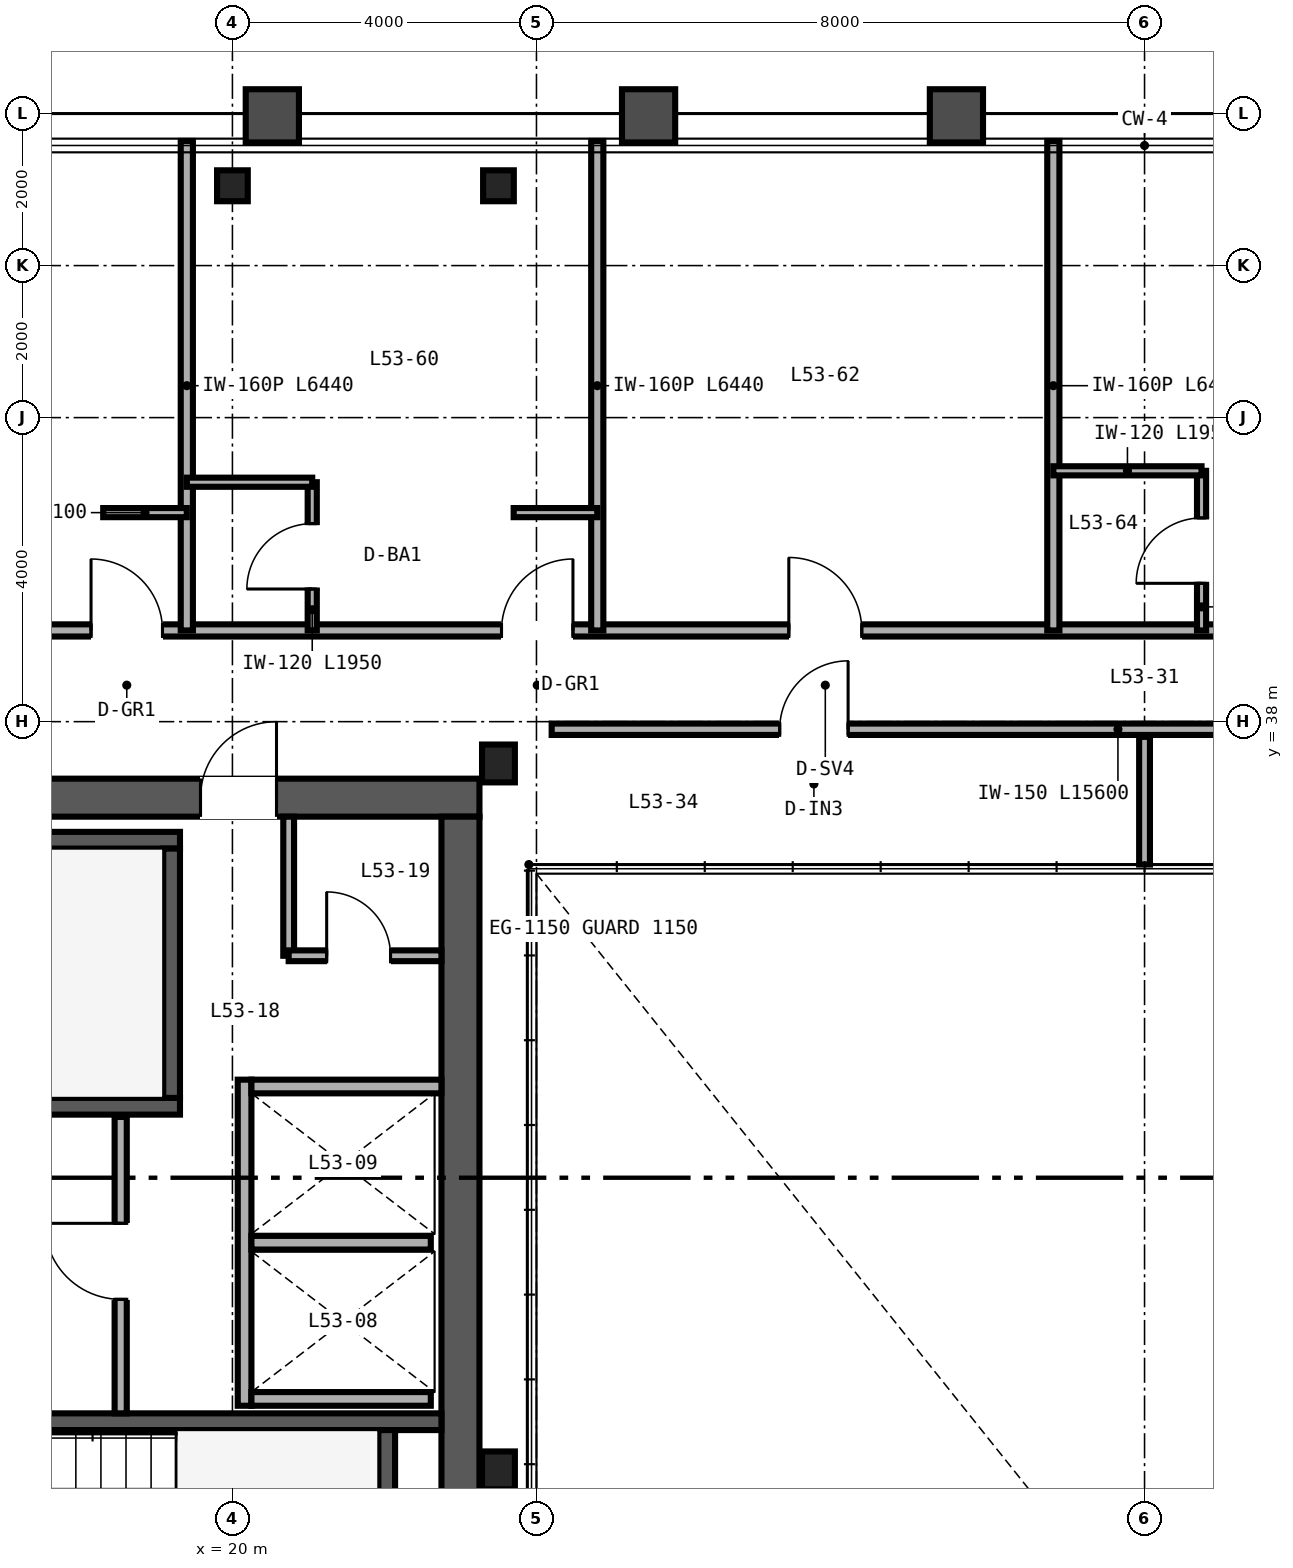
"""IFC4 building model, lengths in metres.
Left out: names, types, materials, properties, quantities, classifications, styles, units other than length and angle.
Written with IfcOpenShell. Run it as: python <this file> out.ifc"""

import sys

from ifc_helpers import new_model, si_unit, direction, frame, frame_2d, origin, origin_2d, place, context, subcontext, project, spatial, rectangle, i_section, extrude, source, transform, mapped, element, fill, save


model = new_model("IFC4")
c1 = context("Model", 3, precision=1e-05, world=origin(), true_north=direction((0.0, 1.0)))
c2 = subcontext(c1, "Body", "Model", "MODEL_VIEW")
j1 = project(units=[si_unit("LENGTHUNIT", "METRE"), si_unit("PLANEANGLEUNIT", "RADIAN")], contexts=[c1])
p1 = place(None, origin())
s1 = spatial("IfcSite", under=j1, at=p1, CompositionType="ELEMENT")
p2 = place(p1, origin())
s2 = spatial("IfcBuilding", under=s1, at=p2, CompositionType="ELEMENT")
p3 = place(p2, frame((0.0, 0.0, 210.0)))
s3 = spatial("IfcBuildingStorey", under=s2, at=p3, CompositionType="ELEMENT", Elevation=210.0)
p4 = place(p3, frame((10.75, 37.0, 0.0), z_axis=(0.0, 0.0, 1.0), x_axis=(1.0, 0.0, 0.0)))
e1 = element("IfcWall", 1, at=p4, inside=s3, PredefinedType="SHEAR", context=c2, shape_type="SweptSolid", body=[
    extrude(rectangle(XDim=12.5, YDim=0.5, at=frame_2d((6.25, 0.0))), origin(), (0.0, 0.0, 1.0), 3.37),
])
p5 = place(p4, frame((8.83, 0.0, 0.0)))
e2 = element("IfcOpeningElement", 2, at=p5, cuts=e1, PredefinedType="OPENING", context=c2, shape_type="SweptSolid", body=[
    extrude(rectangle(XDim=1.0, YDim=2.15, at=frame_2d((0.5, 1.075))), frame((0.0, 0.26, 0.0), z_axis=(0.0, -1.0, 0.0), x_axis=(1.0, 0.0, 0.0)), (0.0, 0.0, 1.0), 0.52),
])
p6 = place(p3, frame((23.0, 15.25, 0.0), z_axis=(0.0, 0.0, 1.0), x_axis=(0.0, 1.0, 0.0)))
e3 = element("IfcWall", 3, at=p6, inside=s3, PredefinedType="SHEAR", context=c2, shape_type="SweptSolid", body=[
    extrude(rectangle(XDim=21.5, YDim=0.5, at=frame_2d((10.75, 0.0))), origin(), (0.0, 0.0, 1.0), 3.37),
])
p7 = place(p3, frame((11.25, 32.94, 0.0), z_axis=(0.0, 0.0, 1.0), x_axis=(1.0, 0.0, 0.0)))
e4 = element("IfcWall", 4, at=p7, inside=s3, PredefinedType="SHEAR", context=c2, shape_type="SweptSolid", body=[
    extrude(rectangle(XDim=8.06, YDim=0.22, at=frame_2d((4.03, 0.0))), origin(), (0.0, 0.0, 1.0), 3.4),
])
p8 = place(p7, frame((0.67, 0.0, 0.0)))
e5 = element("IfcOpeningElement", 5, at=p8, cuts=e4, PredefinedType="OPENING", context=c2, shape_type="SweptSolid", body=[
    extrude(rectangle(XDim=1.05, YDim=2.15, at=frame_2d((0.525, 1.075))), frame((0.0, 0.12, 0.0), z_axis=(0.0, -1.0, 0.0), x_axis=(1.0, 0.0, 0.0)), (0.0, 0.0, 1.0), 0.24),
])
p9 = place(p3, frame((11.25, 36.44, 0.0), z_axis=(0.0, 0.0, 1.0), x_axis=(1.0, 0.0, 0.0)))
e6 = element("IfcWall", 6, at=p9, inside=s3, PredefinedType="SHEAR", context=c2, shape_type="SweptSolid", body=[
    extrude(rectangle(XDim=8.06, YDim=0.22, at=frame_2d((4.03, 0.0))), origin(), (0.0, 0.0, 1.0), 3.4),
])
p10 = place(p3, frame((19.2, 33.05, 0.0), z_axis=(0.0, 0.0, 1.0), x_axis=(0.0, 1.0, 0.0)))
e7 = element("IfcWall", 7, at=p10, inside=s3, PredefinedType="SHEAR", context=c2, shape_type="SweptSolid", body=[
    extrude(rectangle(XDim=3.28, YDim=0.22, at=frame_2d((1.64, 0.0))), origin(), (0.0, 0.0, 1.0), 3.4),
])
p11 = place(p3, frame((14.18, 28.79, 0.0), z_axis=(0.0, 0.0, 1.0), x_axis=(1.0, 0.0, 0.0)))
e8 = element("IfcWall", 8, at=p11, inside=s3, PredefinedType="SHEAR", context=c2, shape_type="SweptSolid", body=[
    extrude(rectangle(XDim=8.57, YDim=0.22, at=frame_2d((4.285, 0.0))), origin(), (0.0, 0.0, 1.0), 3.4),
])
p12 = place(p3, frame((22.03, 25.4, 0.0), z_axis=(0.0, 0.0, 1.0), x_axis=(0.0, 1.0, 0.0)))
e9 = element("IfcWall", 9, at=p12, inside=s3, PredefinedType="SHEAR", context=c2, shape_type="SweptSolid", body=[
    extrude(rectangle(XDim=3.28, YDim=0.22, at=frame_2d((1.64, 0.0))), origin(), (0.0, 0.0, 1.0), 3.4),
])
m1 = source(origin(), c2, "Body", "SweptSolid", [
    extrude(i_section(OverallWidth=0.432, OverallDepth=0.498, WebThickness=0.056, FlangeThickness=0.089, FilletRadius=0.025, at=origin_2d()), origin(), (0.0, 0.0, 1.0), 3.37),
])
for number, where, z_axis, x_axis in (
    (10, (23.5, 28.15, 0.0), (0.0, 0.0, 1.0), (1.0, 0.0, 0.0)),
    (11, (23.5, 37.45, 0.0), (0.0, 0.0, 1.0), (1.0, 0.0, 0.0)),
):
    element("IfcColumn", number, at=place(p3, frame(where, z_axis=z_axis, x_axis=x_axis)), inside=s3, PredefinedType="COLUMN", context=c2, shape_type="MappedRepresentation", body=[
        mapped(m1, transform((0.0, 0.0, 0.0), scale=1.0)),
    ])
m2 = source(origin(), c2, "Body", "SweptSolid", [
    extrude(i_section(OverallWidth=0.404, OverallDepth=0.407, WebThickness=0.027, FlangeThickness=0.044, FilletRadius=0.025, at=origin_2d()), origin(), (0.0, 0.0, 1.0), 3.37),
])
for number, where, z_axis, x_axis in (
    (12, (20.0, 45.05, 0.0), (0.0, 0.0, 1.0), (1.0, 0.0, 0.0)),
    (13, (23.5, 45.05, 0.0), (0.0, 0.0, 1.0), (1.0, 0.0, 0.0)),
):
    element("IfcColumn", number, at=place(p3, frame(where, z_axis=z_axis, x_axis=x_axis)), inside=s3, PredefinedType="COLUMN", context=c2, shape_type="MappedRepresentation", body=[
        mapped(m2, transform((0.0, 0.0, 0.0), scale=1.0)),
    ])
p13 = place(p3, frame((20.16, 29.0, 0.0), z_axis=(0.0, 0.0, 1.0), x_axis=(0.0, 1.0, 0.0)))
e14 = element("IfcWall", 14, at=p13, inside=s3, PredefinedType="SOLIDWALL", context=c2, shape_type="SweptSolid", body=[
    extrude(rectangle(XDim=4.29, YDim=0.18, at=frame_2d((2.145, 0.0))), origin(), (0.0, 0.0, 1.0), 3.37),
])
p14 = place(p3, frame((20.25, 29.09, 0.0), z_axis=(0.0, 0.0, 1.0), x_axis=(1.0, 0.0, 0.0)))
e15 = element("IfcWall", 15, at=p14, inside=s3, PredefinedType="SOLIDWALL", context=c2, shape_type="SweptSolid", body=[
    extrude(rectangle(XDim=2.36, YDim=0.18, at=frame_2d((1.18, 0.0))), origin(), (0.0, 0.0, 1.0), 3.37),
])
p15 = place(p3, frame((20.25, 33.2, 0.0), z_axis=(0.0, 0.0, 1.0), x_axis=(1.0, 0.0, 0.0)))
e16 = element("IfcWall", 16, at=p15, inside=s3, PredefinedType="SOLIDWALL", context=c2, shape_type="SweptSolid", body=[
    extrude(rectangle(XDim=2.5, YDim=0.18, at=frame_2d((1.25, 0.0))), origin(), (0.0, 0.0, 1.0), 3.37),
])
p16 = place(p3, frame((20.25, 31.145, 0.0), z_axis=(0.0, 0.0, 1.0), x_axis=(1.0, 0.0, 0.0)))
e17 = element("IfcWall", 17, at=p16, inside=s3, PredefinedType="SOLIDWALL", context=c2, shape_type="SweptSolid", body=[
    extrude(rectangle(XDim=2.36, YDim=0.18, at=frame_2d((1.18, 0.0))), origin(), (0.0, 0.0, 1.0), 3.37),
])
p17 = place(p3, frame((18.53, 28.9, 0.0), z_axis=(0.0, 0.0, 1.0), x_axis=(0.0, 1.0, 0.0)))
e18 = element("IfcWall", 18, at=p17, inside=s3, PredefinedType="PARTITIONING", context=c2, shape_type="SweptSolid", body=[
    extrude(rectangle(XDim=3.9, YDim=0.16, at=frame_2d((1.95, 0.0))), origin(), (0.0, 0.0, 1.0), 3.37),
])
p18 = place(p17, frame((1.5, 0.0, 0.0)))
e19 = element("IfcOpeningElement", 19, at=p18, cuts=e18, PredefinedType="OPENING", context=c2, shape_type="SweptSolid", body=[
    extrude(rectangle(XDim=1.0, YDim=2.15, at=frame_2d((0.5, 1.075))), frame((0.0, 0.09, 0.0), z_axis=(0.0, -1.0, 0.0), x_axis=(1.0, 0.0, 0.0)), (0.0, 0.0, 1.0), 0.18),
])
p19 = place(p3, frame((20.74, 34.92, 0.0), z_axis=(0.0, 0.0, 1.0), x_axis=(0.0, 1.0, 0.0)))
e20 = element("IfcWall", 20, at=p19, inside=s3, PredefinedType="PARTITIONING", context=c2, shape_type="SweptSolid", body=[
    extrude(rectangle(XDim=1.83, YDim=0.142, at=frame_2d((0.915, 0.0))), origin(), (0.0, 0.0, 1.0), 3.37),
])
p20 = place(p3, frame((20.74, 34.92, 0.0), z_axis=(0.0, 0.0, 1.0), x_axis=(1.0, 0.0, 0.0)))
e21 = element("IfcWall", 21, at=p20, inside=s3, PredefinedType="PARTITIONING", context=c2, shape_type="SweptSolid", body=[
    extrude(rectangle(XDim=2.01, YDim=0.142, at=frame_2d((1.005, 0.0))), origin(), (0.0, 0.0, 1.0), 3.37),
])
p21 = place(p20, frame((0.5, 0.0, 0.0)))
e22 = element("IfcOpeningElement", 22, at=p21, cuts=e21, PredefinedType="OPENING", context=c2, shape_type="SweptSolid", body=[
    extrude(rectangle(XDim=0.84, YDim=2.1, at=frame_2d((0.42, 1.05))), frame((0.0, 0.081, 0.0), z_axis=(0.0, -1.0, 0.0), x_axis=(1.0, 0.0, 0.0)), (0.0, 0.0, 1.0), 0.162),
])
p22 = place(p3, frame((24.2, 37.9, 0.0), z_axis=(0.0, 0.0, 1.0), x_axis=(1.0, 0.0, 0.0)))
e23 = element("IfcWall", 23, at=p22, inside=s3, PredefinedType="PARTITIONING", context=c2, shape_type="SweptSolid", body=[
    extrude(rectangle(XDim=15.6, YDim=0.15, at=frame_2d((7.8, 0.0))), origin(), (0.0, 0.0, 1.0), 3.37),
])
p23 = place(p22, frame((3.0, 0.0, 0.0)))
e24 = element("IfcOpeningElement", 24, at=p23, cuts=e23, PredefinedType="OPENING", context=c2, shape_type="SweptSolid", body=[
    extrude(rectangle(XDim=0.9, YDim=2.15, at=frame_2d((0.45, 1.075))), frame((0.0, 0.085, 0.0), z_axis=(0.0, -1.0, 0.0), x_axis=(1.0, 0.0, 0.0)), (0.0, 0.0, 1.0), 0.17),
])
p24 = place(p22, frame((11.0, 0.0, 0.0)))
e25 = element("IfcOpeningElement", 25, at=p24, cuts=e23, PredefinedType="OPENING", context=c2, shape_type="SweptSolid", body=[
    extrude(rectangle(XDim=0.9, YDim=2.15, at=frame_2d((0.45, 1.075))), frame((0.0, 0.085, 0.0), z_axis=(0.0, -1.0, 0.0), x_axis=(1.0, 0.0, 0.0)), (0.0, 0.0, 1.0), 0.17),
])
p25 = place(p3, frame((32.0, 36.12, 0.0), z_axis=(0.0, 0.0, 1.0), x_axis=(0.0, 1.0, 0.0)))
e26 = element("IfcWall", 26, at=p25, inside=s3, PredefinedType="PARTITIONING", context=c2, shape_type="SweptSolid", body=[
    extrude(rectangle(XDim=1.68, YDim=0.142, at=frame_2d((0.84, 0.0))), origin(), (0.0, 0.0, 1.0), 3.37),
])
p26 = place(p3, frame((14.0, 39.2, 0.0), z_axis=(0.0, 0.0, 1.0), x_axis=(1.0, 0.0, 0.0)))
e27 = element("IfcWall", 27, at=p26, inside=s3, PredefinedType="PARTITIONING", context=c2, shape_type="SweptSolid", body=[
    extrude(rectangle(XDim=36.0, YDim=0.16, at=frame_2d((18.0, 0.0))), origin(), (0.0, 0.0, 1.0), 2.913),
])
p27 = place(p26, frame((4.14, 0.0, 0.0)))
e28 = element("IfcOpeningElement", 28, at=p27, cuts=e27, PredefinedType="OPENING", context=c2, shape_type="SweptSolid", body=[
    extrude(rectangle(XDim=0.94, YDim=2.15, at=frame_2d((0.47, 1.075))), frame((0.0, 0.09, 0.0), z_axis=(0.0, -1.0, 0.0), x_axis=(1.0, 0.0, 0.0)), (0.0, 0.0, 1.0), 0.18),
])
p28 = place(p26, frame((9.54, 0.0, 0.0)))
e29 = element("IfcOpeningElement", 29, at=p28, cuts=e27, PredefinedType="OPENING", context=c2, shape_type="SweptSolid", body=[
    extrude(rectangle(XDim=0.94, YDim=2.15, at=frame_2d((0.47, 1.075))), frame((0.0, 0.09, 0.0), z_axis=(0.0, -1.0, 0.0), x_axis=(1.0, 0.0, 0.0)), (0.0, 0.0, 1.0), 0.18),
])
p29 = place(p26, frame((13.32, 0.0, 0.0)))
e30 = element("IfcOpeningElement", 30, at=p29, cuts=e27, PredefinedType="OPENING", context=c2, shape_type="SweptSolid", body=[
    extrude(rectangle(XDim=0.96, YDim=2.15, at=frame_2d((0.48, 1.075))), frame((0.0, 0.09, 0.0), z_axis=(0.0, -1.0, 0.0), x_axis=(1.0, 0.0, 0.0)), (0.0, 0.0, 1.0), 0.18),
])
p30 = place(p26, frame((21.54, 0.0, 0.0)))
e31 = element("IfcOpeningElement", 31, at=p30, cuts=e27, PredefinedType="OPENING", context=c2, shape_type="SweptSolid", body=[
    extrude(rectangle(XDim=0.94, YDim=2.15, at=frame_2d((0.47, 1.075))), frame((0.0, 0.09, 0.0), z_axis=(0.0, -1.0, 0.0), x_axis=(1.0, 0.0, 0.0)), (0.0, 0.0, 1.0), 0.18),
])
p31 = place(p26, frame((28.14, 0.0, 0.0)))
e32 = element("IfcOpeningElement", 32, at=p31, cuts=e27, PredefinedType="OPENING", context=c2, shape_type="SweptSolid", body=[
    extrude(rectangle(XDim=0.94, YDim=2.15, at=frame_2d((0.47, 1.075))), frame((0.0, 0.09, 0.0), z_axis=(0.0, -1.0, 0.0), x_axis=(1.0, 0.0, 0.0)), (0.0, 0.0, 1.0), 0.18),
])
p32 = place(p26, frame((34.74, 0.0, 0.0)))
e33 = element("IfcOpeningElement", 33, at=p32, cuts=e27, PredefinedType="OPENING", context=c2, shape_type="SweptSolid", body=[
    extrude(rectangle(XDim=0.94, YDim=2.15, at=frame_2d((0.47, 1.075))), frame((0.0, 0.09, 0.0), z_axis=(0.0, -1.0, 0.0), x_axis=(1.0, 0.0, 0.0)), (0.0, 0.0, 1.0), 0.18),
])
p33 = place(p3, frame((19.4, 39.2, 0.0), z_axis=(0.0, 0.0, 1.0), x_axis=(0.0, 1.0, 0.0)))
e34 = element("IfcWall", 34, at=p33, inside=s3, PredefinedType="PARTITIONING", context=c2, shape_type="SweptSolid", body=[
    extrude(rectangle(XDim=6.44, YDim=0.16, at=frame_2d((3.22, 0.0))), origin(), (0.0, 0.0, 1.0), 2.677),
])
p34 = place(p3, frame((18.3, 40.75, 0.0), z_axis=(0.0, 0.0, 1.0), x_axis=(1.0, 0.0, 0.0)))
e35 = element("IfcWall", 35, at=p34, inside=s3, PredefinedType="PARTITIONING", context=c2, shape_type="SweptSolid", body=[
    extrude(rectangle(XDim=1.1, YDim=0.12, at=frame_2d((0.55, 0.0))), origin(), (0.0, 0.0, 1.0), 3.37),
])
p35 = place(p3, frame((24.8, 39.2, 0.0), z_axis=(0.0, 0.0, 1.0), x_axis=(0.0, 1.0, 0.0)))
e36 = element("IfcWall", 36, at=p35, inside=s3, PredefinedType="PARTITIONING", context=c2, shape_type="SweptSolid", body=[
    extrude(rectangle(XDim=6.44, YDim=0.16, at=frame_2d((3.22, 0.0))), origin(), (0.0, 0.0, 1.0), 2.443),
])
p36 = place(p3, frame((21.05, 39.2, 0.0), z_axis=(0.0, 0.0, 1.0), x_axis=(0.0, 1.0, 0.0)))
e37 = element("IfcWall", 37, at=p36, inside=s3, PredefinedType="PARTITIONING", context=c2, shape_type="SweptSolid", body=[
    extrude(rectangle(XDim=1.95, YDim=0.12, at=frame_2d((0.975, 0.0))), origin(), (0.0, 0.0, 1.0), 3.37),
])
p37 = place(p36, frame((0.545, 0.0, 0.0)))
e38 = element("IfcOpeningElement", 38, at=p37, cuts=e37, PredefinedType="OPENING", context=c2, shape_type="SweptSolid", body=[
    extrude(rectangle(XDim=0.86, YDim=2.1, at=frame_2d((0.43, 1.05))), frame((0.0, 0.07, 0.0), z_axis=(0.0, -1.0, 0.0), x_axis=(1.0, 0.0, 0.0)), (0.0, 0.0, 1.0), 0.14),
])
p38 = place(p3, frame((19.4, 41.15, 0.0), z_axis=(0.0, 0.0, 1.0), x_axis=(1.0, 0.0, 0.0)))
e39 = element("IfcWall", 39, at=p38, inside=s3, PredefinedType="PARTITIONING", context=c2, shape_type="SweptSolid", body=[
    extrude(rectangle(XDim=1.65, YDim=0.12, at=frame_2d((0.825, 0.0))), origin(), (0.0, 0.0, 1.0), 3.37),
])
p39 = place(p3, frame((23.7, 40.75, 0.0), z_axis=(0.0, 0.0, 1.0), x_axis=(1.0, 0.0, 0.0)))
e40 = element("IfcWall", 40, at=p39, inside=s3, PredefinedType="PARTITIONING", context=c2, shape_type="SweptSolid", body=[
    extrude(rectangle(XDim=1.1, YDim=0.12, at=frame_2d((0.55, 0.0))), origin(), (0.0, 0.0, 1.0), 2.913),
])
p40 = place(p3, frame((30.8, 39.2, 0.0), z_axis=(0.0, 0.0, 1.0), x_axis=(0.0, 1.0, 0.0)))
e41 = element("IfcWall", 41, at=p40, inside=s3, PredefinedType="PARTITIONING", context=c2, shape_type="SweptSolid", body=[
    extrude(rectangle(XDim=6.44, YDim=0.16, at=frame_2d((3.22, 0.0))), origin(), (0.0, 0.0, 1.0), 2.443),
])
p41 = place(p3, frame((32.75, 39.2, 0.0), z_axis=(0.0, 0.0, 1.0), x_axis=(0.0, 1.0, 0.0)))
e42 = element("IfcWall", 42, at=p41, inside=s3, PredefinedType="PARTITIONING", context=c2, shape_type="SweptSolid", body=[
    extrude(rectangle(XDim=2.1, YDim=0.12, at=frame_2d((1.05, 0.0))), origin(), (0.0, 0.0, 1.0), 3.37),
])
p42 = place(p41, frame((0.62, 0.0, 0.0)))
e43 = element("IfcOpeningElement", 43, at=p42, cuts=e42, PredefinedType="OPENING", context=c2, shape_type="SweptSolid", body=[
    extrude(rectangle(XDim=0.86, YDim=2.1, at=frame_2d((0.43, 1.05))), frame((0.0, 0.07, 0.0), z_axis=(0.0, -1.0, 0.0), x_axis=(1.0, 0.0, 0.0)), (0.0, 0.0, 1.0), 0.14),
])
p43 = place(p3, frame((30.8, 41.3, 0.0), z_axis=(0.0, 0.0, 1.0), x_axis=(1.0, 0.0, 0.0)))
e44 = element("IfcWall", 44, at=p43, inside=s3, PredefinedType="PARTITIONING", context=c2, shape_type="SweptSolid", body=[
    extrude(rectangle(XDim=1.95, YDim=0.12, at=frame_2d((0.975, 0.0))), origin(), (0.0, 0.0, 1.0), 3.37),
])
m3 = source(origin(), c2, "Body", "SweptSolid", [
    extrude(rectangle(XDim=1.0, YDim=2.15, at=frame_2d((0.5, 1.075))), frame((0.0, 0.025, 0.0), z_axis=(0.0, -1.0, 0.0), x_axis=(1.0, 0.0, 0.0)), (0.0, 0.0, 1.0), 0.05),
])
p44 = place(p18, origin())
e45 = element("IfcDoor", 45, at=p44, inside=s3, OperationType="SINGLE_SWING_RIGHT", PredefinedType="DOOR", context=c2, shape_type="MappedRepresentation", body=[
    mapped(m3, transform((0.0, 0.0, 0.0), scale=1.0)),
])
fill(e19, e45)
m4 = source(origin(), c2, "Body", "SweptSolid", [
    extrude(rectangle(XDim=0.84, YDim=2.1, at=frame_2d((0.42, 1.05))), frame((0.0, 0.025, 0.0), z_axis=(0.0, -1.0, 0.0), x_axis=(1.0, 0.0, 0.0)), (0.0, 0.0, 1.0), 0.05),
])
p45 = place(p21, origin())
e46 = element("IfcDoor", 46, at=p45, inside=s3, OperationType="SINGLE_SWING_LEFT", PredefinedType="DOOR", context=c2, shape_type="MappedRepresentation", body=[
    mapped(m4, transform((0.0, 0.0, 0.0), scale=1.0)),
])
fill(e22, e46)
p46 = place(p5, origin())
e47 = element("IfcDoor", 47, at=p46, inside=s3, OperationType="SINGLE_SWING_RIGHT", PredefinedType="DOOR", context=c2, shape_type="MappedRepresentation", body=[
    mapped(m3, transform((0.0, 0.0, 0.0), scale=1.0)),
])
fill(e2, e47)
m5 = source(origin(), c2, "Body", "SweptSolid", [
    extrude(rectangle(XDim=0.9, YDim=2.15, at=frame_2d((0.45, 1.075))), frame((0.0, 0.025, 0.0), z_axis=(0.0, -1.0, 0.0), x_axis=(1.0, 0.0, 0.0)), (0.0, 0.0, 1.0), 0.05),
])
p47 = place(p23, origin())
e48 = element("IfcDoor", 48, at=p47, inside=s3, OperationType="SINGLE_SWING_RIGHT", PredefinedType="DOOR", context=c2, shape_type="MappedRepresentation", body=[
    mapped(m5, transform((0.0, 0.0, 0.0), scale=1.0)),
])
fill(e24, e48)
m6 = source(origin(), c2, "Body", "SweptSolid", [
    extrude(rectangle(XDim=0.86, YDim=2.1, at=frame_2d((0.43, 1.05))), frame((0.0, 0.025, 0.0), z_axis=(0.0, -1.0, 0.0), x_axis=(1.0, 0.0, 0.0)), (0.0, 0.0, 1.0), 0.05),
])
p48 = place(p37, origin())
e49 = element("IfcDoor", 49, at=p48, inside=s3, OperationType="SINGLE_SWING_LEFT", PredefinedType="DOOR", context=c2, shape_type="MappedRepresentation", body=[
    mapped(m6, transform((0.0, 0.0, 0.0), scale=1.0)),
])
fill(e38, e49)
p49 = place(p42, origin())
e50 = element("IfcDoor", 50, at=p49, inside=s3, OperationType="SINGLE_SWING_LEFT", PredefinedType="DOOR", context=c2, shape_type="MappedRepresentation", body=[
    mapped(m6, transform((0.0, 0.0, 0.0), scale=1.0)),
])
fill(e43, e50)
m7 = source(origin(), c2, "Body", "SweptSolid", [
    extrude(rectangle(XDim=0.94, YDim=2.15, at=frame_2d((0.47, 1.075))), frame((0.0, 0.025, 0.0), z_axis=(0.0, -1.0, 0.0), x_axis=(1.0, 0.0, 0.0)), (0.0, 0.0, 1.0), 0.05),
])
p50 = place(p27, origin())
e51 = element("IfcDoor", 51, at=p50, inside=s3, OperationType="SINGLE_SWING_LEFT", PredefinedType="DOOR", context=c2, shape_type="MappedRepresentation", body=[
    mapped(m7, transform((0.0, 0.0, 0.0), scale=1.0)),
])
fill(e28, e51)
p51 = place(p28, origin())
e52 = element("IfcDoor", 52, at=p51, inside=s3, OperationType="SINGLE_SWING_RIGHT", PredefinedType="DOOR", context=c2, shape_type="MappedRepresentation", body=[
    mapped(m7, transform((0.0, 0.0, 0.0), scale=1.0)),
])
fill(e29, e52)
m8 = source(origin(), c2, "Body", "SweptSolid", [
    extrude(rectangle(XDim=0.96, YDim=2.15, at=frame_2d((0.48, 1.075))), frame((0.0, 0.025, 0.0), z_axis=(0.0, -1.0, 0.0), x_axis=(1.0, 0.0, 0.0)), (0.0, 0.0, 1.0), 0.05),
])
p52 = place(p29, origin())
e53 = element("IfcDoor", 53, at=p52, inside=s3, OperationType="SINGLE_SWING_LEFT", PredefinedType="DOOR", context=c2, shape_type="MappedRepresentation", body=[
    mapped(m8, transform((0.0, 0.0, 0.0), scale=1.0)),
])
fill(e30, e53)
save(model, sys.argv[1])
